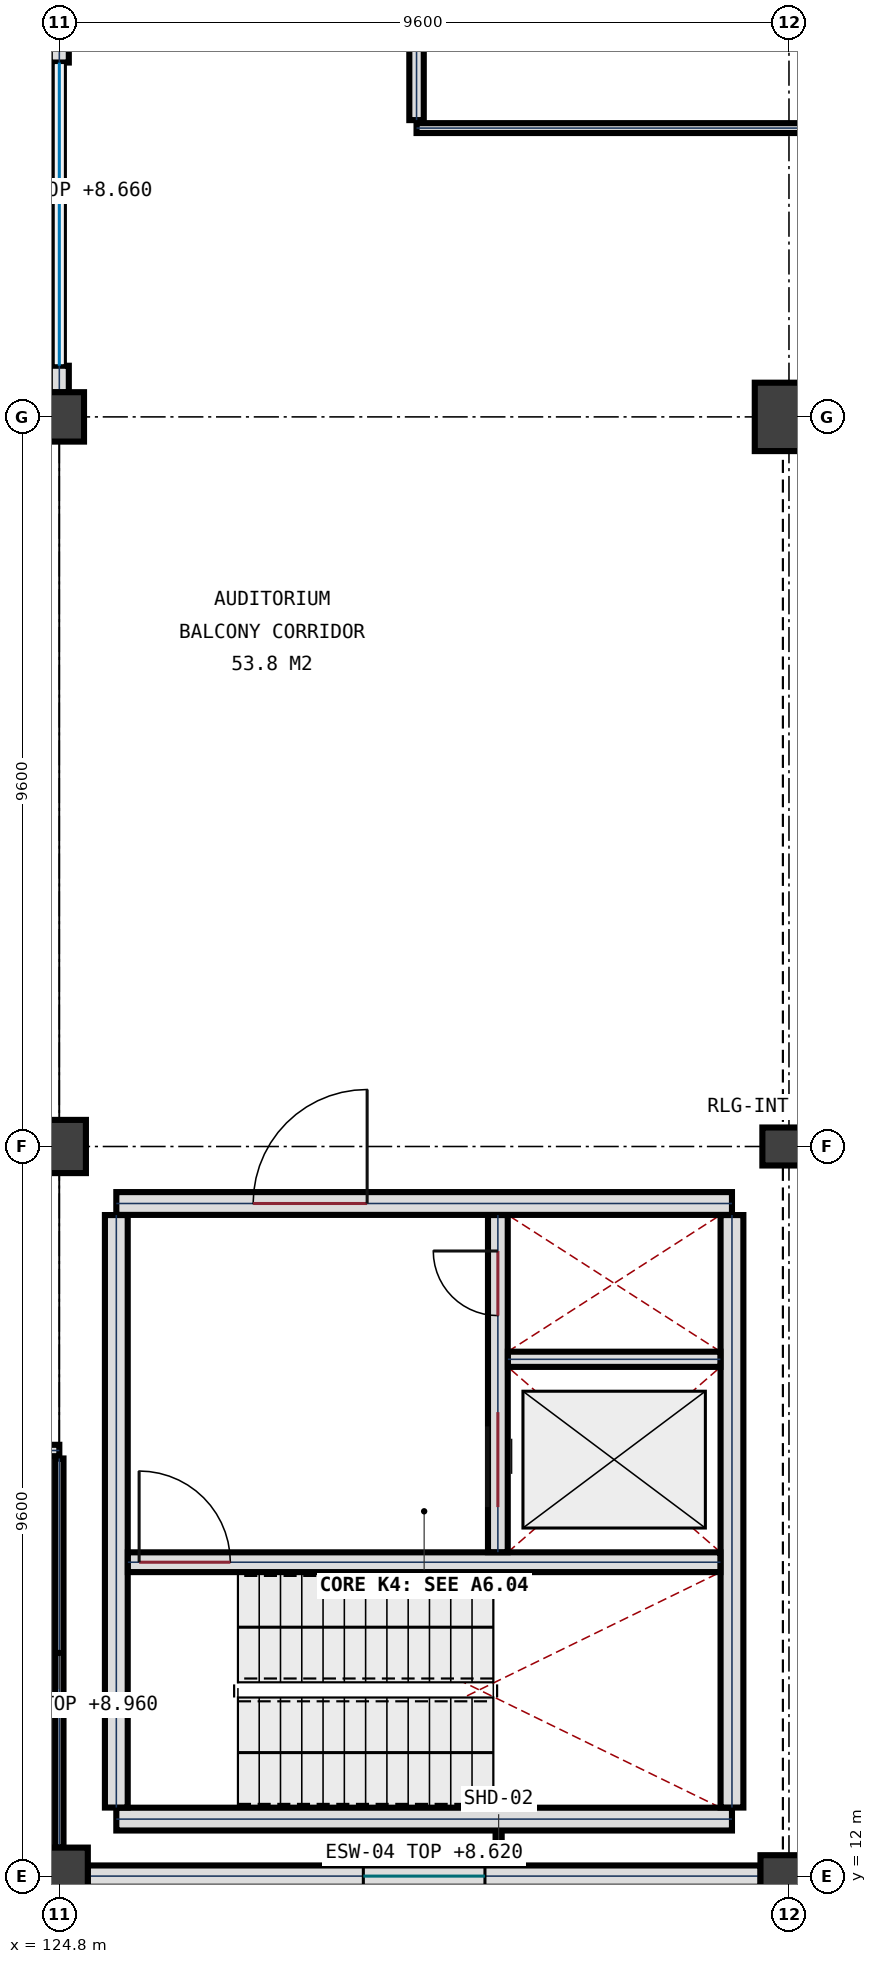
"""IFC4 building model, lengths in metres.
Left out: names, types, materials, properties, quantities, classifications, styles, units other than length and angle.
Written with IfcOpenShell. Run it as: python <this file> out.ifc"""

import sys

from ifc_helpers import new_model, si_unit, direction, frame, frame_2d, origin, origin_2d, place, context, subcontext, project, spatial, rectangle, circle, extrude, element, fill, save


model = new_model("IFC4")
c1 = context("Model", 3, precision=1e-05, world=origin(), true_north=direction((0.0, 1.0)))
c2 = subcontext(c1, "Body", "Model", "MODEL_VIEW")
j1 = project(units=[si_unit("LENGTHUNIT", "METRE"), si_unit("PLANEANGLEUNIT", "RADIAN")], contexts=[c1])
p1 = place(None, origin())
s1 = spatial("IfcSite", under=j1, at=p1, CompositionType="ELEMENT")
p2 = place(p1, origin())
s2 = spatial("IfcBuilding", under=s1, at=p2, CompositionType="ELEMENT")
p3 = place(p2, frame((0.0, 0.0, 5.4)))
s3 = spatial("IfcBuildingStorey", under=s2, at=p3, CompositionType="ELEMENT", Elevation=5.4)
p4 = place(p3, frame((124.8, 12.0, 0.0), z_axis=(0.0, 0.0, 1.0), x_axis=(1.0, 0.0, 0.0)))
e1 = element("IfcColumn", 1, at=p4, inside=s3, PredefinedType="COLUMN", context=c2, shape_type="SweptSolid", body=[
    extrude(rectangle(XDim=0.75, YDim=0.75, at=origin_2d()), origin(), (0.0, 0.0, 1.0), 4.5),
])
p5 = place(p3, frame((124.8, 21.6, 0.0), z_axis=(0.0, 0.0, 1.0), x_axis=(1.0, 0.0, 0.0)))
e2 = element("IfcColumn", 2, at=p5, inside=s3, PredefinedType="COLUMN", context=c2, shape_type="SweptSolid", body=[
    extrude(rectangle(XDim=0.7, YDim=0.7, at=origin_2d()), origin(), (0.0, 0.0, 1.0), 4.5),
])
p6 = place(p3, frame((124.8, 31.2, 0.0), z_axis=(0.0, 0.0, 1.0), x_axis=(1.0, 0.0, 0.0)))
e3 = element("IfcColumn", 3, at=p6, inside=s3, PredefinedType="COLUMN", context=c2, shape_type="SweptSolid", body=[
    extrude(rectangle(XDim=0.65, YDim=0.65, at=origin_2d()), origin(), (0.0, 0.0, 1.0), 4.5),
])
p7 = place(p3, frame((134.4, 12.0, 0.0), z_axis=(0.0, 0.0, 1.0), x_axis=(1.0, 0.0, 0.0)))
e4 = element("IfcColumn", 4, at=p7, inside=s3, PredefinedType="COLUMN", context=c2, shape_type="SweptSolid", body=[
    extrude(rectangle(XDim=0.75, YDim=0.55, at=origin_2d()), origin(), (0.0, 0.0, 1.0), 4.5),
])
p8 = place(p3, frame((134.4, 21.6, 0.0), z_axis=(0.0, 0.0, 1.0), x_axis=(1.0, 0.0, 0.0)))
e5 = element("IfcColumn", 5, at=p8, inside=s3, PredefinedType="COLUMN", context=c2, shape_type="SweptSolid", body=[
    extrude(rectangle(XDim=0.7, YDim=0.5, at=origin_2d()), origin(), (0.0, 0.0, 1.0), 4.5),
])
p9 = place(p3, frame((134.4, 31.2, 0.0), z_axis=(0.0, 0.0, 1.0), x_axis=(1.0, 0.0, 0.0)))
e6 = element("IfcColumn", 6, at=p9, inside=s3, PredefinedType="COLUMN", context=c2, shape_type="SweptSolid", body=[
    extrude(circle(Radius=0.45, at=origin_2d()), origin(), (0.0, 0.0, 1.0), 4.5),
])
p10 = place(p3, frame((124.8, 31.523, 0.0), z_axis=(0.0, 0.0, 1.0), x_axis=(0.0, 1.0, 0.0)))
e7 = element("IfcWall", 7, at=p10, inside=s3, PredefinedType="SOLIDWALL", context=c2, shape_type="SweptSolid", body=[
    extrude(rectangle(XDim=0.35, YDim=0.25, at=frame_2d((0.175, 0.0))), origin(), (0.0, 0.0, 1.0), 3.26),
])
p11 = place(p3, frame((124.8, 35.863, 0.0), z_axis=(0.0, 0.0, 1.0), x_axis=(0.0, 1.0, 0.0)))
e8 = element("IfcWall", 8, at=p11, inside=s3, PredefinedType="SOLIDWALL", context=c2, shape_type="SweptSolid", body=[
    extrude(rectangle(XDim=0.3, YDim=0.25, at=frame_2d((0.15, 0.0))), origin(), (0.0, 0.0, 1.0), 3.26),
])
p12 = place(p3, frame((134.027, 12.0, 0.0), z_axis=(0.0, 0.0, 1.0), x_axis=(-1.0, 0.0, 0.0)))
e9 = element("IfcWall", 9, at=p12, inside=s3, PredefinedType="SOLIDWALL", context=c2, shape_type="SweptSolid", body=[
    extrude(rectangle(XDim=8.854, YDim=0.28, at=frame_2d((4.427, 0.0))), origin(), (0.0, 0.0, 1.0), 3.22),
])
p13 = place(p12, frame((3.627, 0.0, 0.95)))
e10 = element("IfcOpeningElement", 10, at=p13, cuts=e9, PredefinedType="OPENING", context=c2, shape_type="SweptSolid", body=[
    extrude(rectangle(XDim=1.6, YDim=1.55, at=frame_2d((0.8, 0.775))), frame((0.0, 0.15, 0.0), z_axis=(0.0, -1.0, 0.0), x_axis=(1.0, 0.0, 0.0)), (0.0, 0.0, 1.0), 0.3),
])
p14 = place(p3, frame((133.65, 12.75, 0.0), z_axis=(0.0, 0.0, 1.0), x_axis=(-1.0, 0.0, 0.0)))
e11 = element("IfcWall", 11, at=p14, inside=s3, PredefinedType="SHEAR", context=c2, shape_type="SweptSolid", body=[
    extrude(rectangle(XDim=8.1, YDim=0.3, at=frame_2d((4.05, 0.0))), origin(), (0.0, 0.0, 1.0), 4.5),
])
p15 = place(p3, frame((125.55, 20.85, 0.0), z_axis=(0.0, 0.0, 1.0), x_axis=(1.0, 0.0, 0.0)))
e12 = element("IfcWall", 12, at=p15, inside=s3, PredefinedType="SHEAR", context=c2, shape_type="SweptSolid", body=[
    extrude(rectangle(XDim=8.1, YDim=0.3, at=frame_2d((4.05, 0.0))), origin(), (0.0, 0.0, 1.0), 4.5),
])
p16 = place(p15, frame((1.8, 0.0, 0.0)))
e13 = element("IfcOpeningElement", 13, at=p16, cuts=e12, PredefinedType="OPENING", context=c2, shape_type="SweptSolid", body=[
    extrude(rectangle(XDim=1.5, YDim=2.25, at=frame_2d((0.75, 1.125))), frame((0.0, 0.16, 0.0), z_axis=(0.0, -1.0, 0.0), x_axis=(1.0, 0.0, 0.0)), (0.0, 0.0, 1.0), 0.32),
])
for number, where, z_axis, x_axis in (
    (14, (125.55, 12.902, 0.0), (0.0, 0.0, 1.0), (0.0, 1.0, 0.0)),
    (15, (133.65, 20.698, 0.0), (0.0, 0.0, 1.0), (0.0, -1.0, 0.0)),
):
    element("IfcWall", number, at=place(p3, frame(where, z_axis=z_axis, x_axis=x_axis)), inside=s3, PredefinedType="SHEAR", context=c2, shape_type="SweptSolid", body=[
        extrude(rectangle(XDim=7.796, YDim=0.3, at=frame_2d((3.898, 0.0))), origin(), (0.0, 0.0, 1.0), 4.5),
    ])
p17 = place(p3, frame((125.702, 16.13, 0.0), z_axis=(0.0, 0.0, 1.0), x_axis=(1.0, 0.0, 0.0)))
e16 = element("IfcWall", 16, at=p17, inside=s3, PredefinedType="SHEAR", context=c2, shape_type="SweptSolid", body=[
    extrude(rectangle(XDim=7.796, YDim=0.26, at=frame_2d((3.898, 0.0))), origin(), (0.0, 0.0, 1.0), 4.5),
])
p18 = place(p17, frame((0.148, 0.0, 0.0)))
e17 = element("IfcOpeningElement", 17, at=p18, cuts=e16, PredefinedType="OPENING", context=c2, shape_type="SweptSolid", body=[
    extrude(rectangle(XDim=1.2, YDim=2.2, at=frame_2d((0.6, 1.1))), frame((0.0, 0.14, 0.0), z_axis=(0.0, -1.0, 0.0), x_axis=(1.0, 0.0, 0.0)), (0.0, 0.0, 1.0), 0.28),
])
p19 = place(p3, frame((130.57, 16.262, 0.0), z_axis=(0.0, 0.0, 1.0), x_axis=(0.0, 1.0, 0.0)))
e18 = element("IfcWall", 18, at=p19, inside=s3, PredefinedType="SHEAR", context=c2, shape_type="SweptSolid", body=[
    extrude(rectangle(XDim=4.436, YDim=0.26, at=frame_2d((2.218, 0.0))), origin(), (0.0, 0.0, 1.0), 4.5),
])
p20 = place(p19, frame((3.113, 0.0, 0.0)))
e19 = element("IfcOpeningElement", 19, at=p20, cuts=e18, PredefinedType="OPENING", context=c2, shape_type="SweptSolid", body=[
    extrude(rectangle(XDim=0.85, YDim=2.05, at=frame_2d((0.425, 1.025))), frame((0.0, 0.14, 0.0), z_axis=(0.0, -1.0, 0.0), x_axis=(1.0, 0.0, 0.0)), (0.0, 0.0, 1.0), 0.28),
])
p21 = place(p19, frame((0.593, 0.0, 0.0)))
e20 = element("IfcOpeningElement", 20, at=p21, cuts=e18, PredefinedType="OPENING", context=c2, shape_type="SweptSolid", body=[
    extrude(rectangle(XDim=1.25, YDim=2.2, at=frame_2d((0.625, 1.1))), frame((0.0, 0.14, 0.0), z_axis=(0.0, -1.0, 0.0), x_axis=(1.0, 0.0, 0.0)), (0.0, 0.0, 1.0), 0.28),
])
p22 = place(p3, frame((130.702, 18.8, 0.0), z_axis=(0.0, 0.0, 1.0), x_axis=(1.0, 0.0, 0.0)))
e21 = element("IfcWall", 21, at=p22, inside=s3, PredefinedType="PLUMBINGWALL", context=c2, shape_type="SweptSolid", body=[
    extrude(rectangle(XDim=2.796, YDim=0.2, at=frame_2d((1.398, 0.0))), origin(), (0.0, 0.0, 1.0), 4.22),
])
p23 = place(p3, frame((84.25, 17.6, 0.0), z_axis=(0.0, 0.0, 1.0), x_axis=(1.0, 0.0, 0.0)))
e22 = element("IfcWall", 22, at=p23, inside=s3, PredefinedType="PARTITIONING", context=c2, shape_type="SweptSolid", body=[
    extrude(rectangle(XDim=40.55, YDim=0.15, at=frame_2d((20.275, 0.0))), origin(), (0.0, 0.0, 1.0), 3.52),
])
p24 = place(p23, frame((8.75, 0.0, 0.0)))
e23 = element("IfcOpeningElement", 23, at=p24, cuts=e22, PredefinedType="OPENING", context=c2, shape_type="SweptSolid", body=[
    extrude(rectangle(XDim=1.0, YDim=2.2, at=frame_2d((0.5, 1.1))), frame((0.0, 0.085, 0.0), z_axis=(0.0, -1.0, 0.0), x_axis=(1.0, 0.0, 0.0)), (0.0, 0.0, 1.0), 0.17),
])
p25 = place(p23, frame((34.45, 0.0, 0.0)))
e24 = element("IfcOpeningElement", 24, at=p25, cuts=e22, PredefinedType="OPENING", context=c2, shape_type="SweptSolid", body=[
    extrude(rectangle(XDim=1.0, YDim=2.2, at=frame_2d((0.5, 1.1))), frame((0.0, 0.085, 0.0), z_axis=(0.0, -1.0, 0.0), x_axis=(1.0, 0.0, 0.0)), (0.0, 0.0, 1.0), 0.17),
])
p26 = place(p3, frame((129.5, 35.0, 0.0), z_axis=(0.0, 0.0, 1.0), x_axis=(1.0, 0.0, 0.0)))
e25 = element("IfcWall", 25, at=p26, inside=s3, PredefinedType="PARTITIONING", context=c2, shape_type="SweptSolid", body=[
    extrude(rectangle(XDim=42.322, YDim=0.13, at=frame_2d((21.161, 0.0))), origin(), (0.0, 0.0, 1.0), 3.31),
])
p27 = place(p26, frame((10.575, 0.0, 0.0)))
e26 = element("IfcOpeningElement", 26, at=p27, cuts=e25, PredefinedType="OPENING", context=c2, shape_type="SweptSolid", body=[
    extrude(rectangle(XDim=1.85, YDim=2.35, at=frame_2d((0.925, 1.175))), frame((0.0, 0.075, 0.0), z_axis=(0.0, -1.0, 0.0), x_axis=(1.0, 0.0, 0.0)), (0.0, 0.0, 1.0), 0.15),
])
p28 = place(p3, frame((124.8, 12.378, 0.0), z_axis=(0.0, 0.0, 1.0), x_axis=(0.0, 1.0, 0.0)))
e27 = element("IfcWall", 27, at=p28, inside=s3, PredefinedType="PARTITIONING", context=c2, shape_type="SweptSolid", body=[
    extrude(rectangle(XDim=5.117, YDim=0.11, at=frame_2d((2.559, 0.0))), origin(), (0.0, 0.0, 1.0), 3.56),
])
p29 = place(p3, frame((129.5, 35.105, 0.0), z_axis=(0.0, 0.0, 1.0), x_axis=(0.0, 1.0, 0.0)))
e28 = element("IfcWall", 28, at=p29, inside=s3, PredefinedType="PARTITIONING", context=c2, shape_type="SweptSolid", body=[
    extrude(rectangle(XDim=5.566, YDim=0.19, at=frame_2d((2.783, 0.0))), origin(), (0.0, 0.0, 1.0), 2.65),
])
p30 = place(p13, origin())
e29 = element("IfcWindow", 29, at=p30, inside=s3, PartitioningType="SINGLE_PANEL", PredefinedType="WINDOW", context=c2, shape_type="SweptSolid", body=[
    extrude(rectangle(XDim=1.6, YDim=1.55, at=frame_2d((0.8, 0.775))), frame((0.0, 0.032, 0.0), z_axis=(0.0, -1.0, 0.0), x_axis=(1.0, 0.0, 0.0)), (0.0, 0.0, 1.0), 0.065),
])
fill(e10, e29)
p31 = place(p16, origin())
e30 = element("IfcDoor", 30, at=p31, inside=s3, OperationType="SINGLE_SWING_RIGHT", PredefinedType="DOOR", context=c2, shape_type="SweptSolid", body=[
    extrude(rectangle(XDim=1.5, YDim=2.25, at=frame_2d((0.75, 1.125))), frame((0.0, 0.032, 0.0), z_axis=(0.0, -1.0, 0.0), x_axis=(1.0, 0.0, 0.0)), (0.0, 0.0, 1.0), 0.065),
])
fill(e13, e30)
p32 = place(p18, origin())
e31 = element("IfcDoor", 31, at=p32, inside=s3, OperationType="SINGLE_SWING_LEFT", PredefinedType="DOOR", context=c2, shape_type="SweptSolid", body=[
    extrude(rectangle(XDim=1.2, YDim=2.2, at=frame_2d((0.6, 1.1))), frame((0.0, 0.032, 0.0), z_axis=(0.0, -1.0, 0.0), x_axis=(1.0, 0.0, 0.0)), (0.0, 0.0, 1.0), 0.065),
])
fill(e17, e31)
p33 = place(p20, origin())
e32 = element("IfcDoor", 32, at=p33, inside=s3, OperationType="SINGLE_SWING_RIGHT", PredefinedType="DOOR", context=c2, shape_type="SweptSolid", body=[
    extrude(rectangle(XDim=0.85, YDim=2.05, at=frame_2d((0.425, 1.025))), frame((0.0, 0.032, 0.0), z_axis=(0.0, -1.0, 0.0), x_axis=(1.0, 0.0, 0.0)), (0.0, 0.0, 1.0), 0.065),
])
fill(e19, e32)
p34 = place(p21, origin())
e33 = element("IfcDoor", 33, at=p34, inside=s3, OperationType="SLIDING_TO_LEFT", PredefinedType="DOOR", context=c2, shape_type="SweptSolid", body=[
    extrude(rectangle(XDim=1.25, YDim=2.2, at=frame_2d((0.625, 1.1))), frame((0.0, 0.032, 0.0), z_axis=(0.0, -1.0, 0.0), x_axis=(1.0, 0.0, 0.0)), (0.0, 0.0, 1.0), 0.065),
])
fill(e20, e33)
save(model, sys.argv[1])
